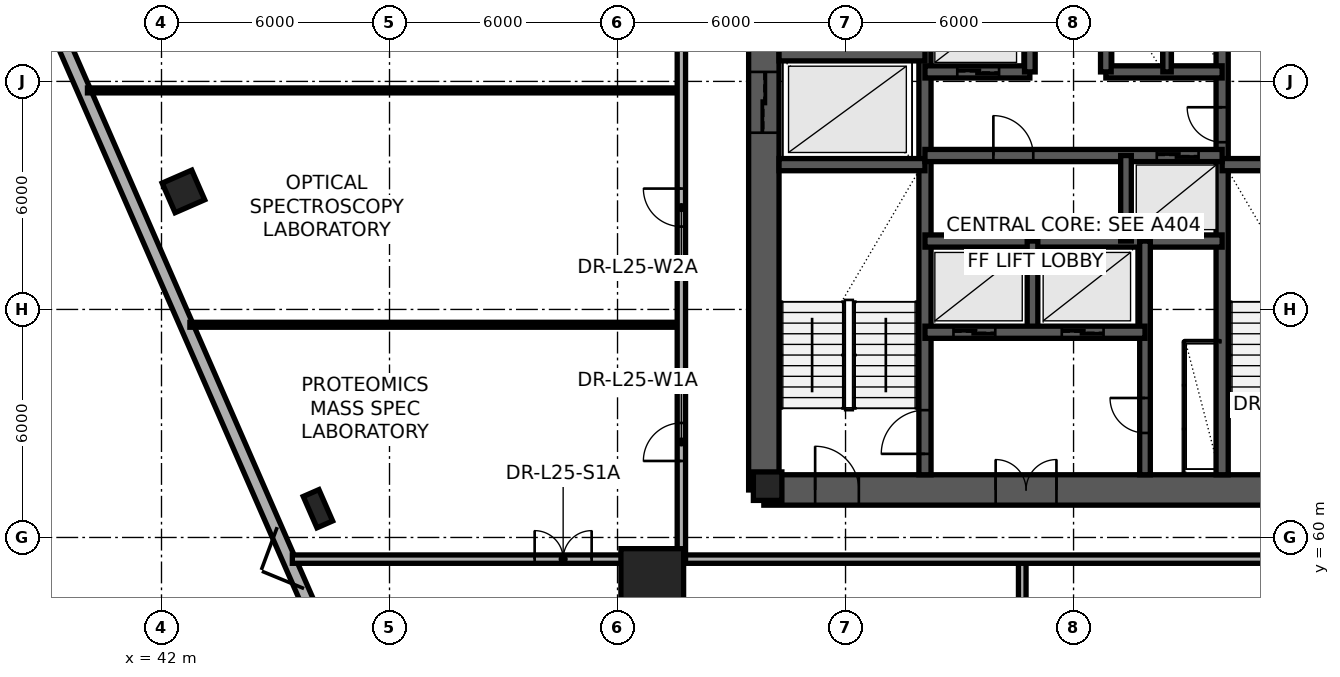
"""IFC4 building model, lengths in metres.
Left out: names, types, materials, properties, quantities, classifications, styles, units other than length and angle.
Written with IfcOpenShell. Run it as: python <this file> out.ifc"""

import sys

from ifc_helpers import new_model, si_unit, direction, frame, frame_2d, origin, origin_2d, place, context, subcontext, project, spatial, rectangle, extrude, element, fill, save


model = new_model("IFC4")
c1 = context("Model", 3, precision=1e-05, world=origin(), true_north=direction((0.0, 1.0)))
c2 = subcontext(c1, "Body", "Model", "MODEL_VIEW")
j1 = project(units=[si_unit("LENGTHUNIT", "METRE"), si_unit("PLANEANGLEUNIT", "RADIAN")], contexts=[c1])
p1 = place(None, origin())
s1 = spatial("IfcSite", under=j1, at=p1, CompositionType="ELEMENT")
p2 = place(p1, origin())
s2 = spatial("IfcBuilding", under=s1, at=p2, CompositionType="ELEMENT")
p3 = place(p2, frame((0.0, 0.0, 96.9)))
s3 = spatial("IfcBuildingStorey", under=s2, at=p3, CompositionType="ELEMENT", Elevation=96.9)
p4 = place(p3, frame((57.85, 61.25, 0.0), z_axis=(0.0, 0.0, 1.0), x_axis=(1.0, 0.0, 0.0)))
e1 = element("IfcWall", 1, at=p4, inside=s3, PredefinedType="SHEAR", context=c2, shape_type="SweptSolid", body=[
    extrude(rectangle(XDim=16.3, YDim=0.8, at=frame_2d((8.15, 0.0))), origin(), (0.0, 0.0, 1.0), 3.65),
])
p5 = place(p4, frame((1.35, 0.0, 0.0)))
e2 = element("IfcOpeningElement", 2, at=p5, cuts=e1, PredefinedType="OPENING", context=c2, shape_type="SweptSolid", body=[
    extrude(rectangle(XDim=1.15, YDim=2.15, at=frame_2d((0.575, 1.075))), frame((0.0, 0.41, 0.0), z_axis=(0.0, -1.0, 0.0), x_axis=(1.0, 0.0, 0.0)), (0.0, 0.0, 1.0), 0.82),
])
p6 = place(p4, frame((6.1, 0.0, 0.0)))
e3 = element("IfcOpeningElement", 3, at=p6, cuts=e1, PredefinedType="OPENING", context=c2, shape_type="SweptSolid", body=[
    extrude(rectangle(XDim=1.6, YDim=2.15, at=frame_2d((0.8, 1.075))), frame((0.0, 0.41, 0.0), z_axis=(0.0, -1.0, 0.0), x_axis=(1.0, 0.0, 0.0)), (0.0, 0.0, 1.0), 0.82),
])
p7 = place(p4, frame((13.55, 0.0, 0.0)))
e4 = element("IfcOpeningElement", 4, at=p7, cuts=e1, PredefinedType="OPENING", context=c2, shape_type="SweptSolid", body=[
    extrude(rectangle(XDim=1.15, YDim=2.15, at=frame_2d((0.575, 1.075))), frame((0.0, 0.41, 0.0), z_axis=(0.0, -1.0, 0.0), x_axis=(1.0, 0.0, 0.0)), (0.0, 0.0, 1.0), 0.82),
])
p8 = place(p3, frame((57.85, 74.75, 0.0), z_axis=(0.0, 0.0, 1.0), x_axis=(0.0, -1.0, 0.0)))
e5 = element("IfcWall", 5, at=p8, inside=s3, PredefinedType="SHEAR", context=c2, shape_type="SweptSolid", body=[
    extrude(rectangle(XDim=13.5, YDim=0.8, at=frame_2d((6.75, 0.0))), origin(), (0.0, 0.0, 1.0), 3.65),
])
p9 = place(p8, frame((0.8, 0.0, 0.0)))
e6 = element("IfcOpeningElement", 6, at=p9, cuts=e5, PredefinedType="OPENING", context=c2, shape_type="SweptSolid", body=[
    extrude(rectangle(XDim=0.92, YDim=2.05, at=frame_2d((0.46, 1.025))), frame((0.0, 0.41, 0.0), z_axis=(0.0, -1.0, 0.0), x_axis=(1.0, 0.0, 0.0)), (0.0, 0.0, 1.0), 0.82),
])
p10 = place(p8, frame((2.5, 0.0, 0.0)))
e7 = element("IfcOpeningElement", 7, at=p10, cuts=e5, PredefinedType="OPENING", context=c2, shape_type="SweptSolid", body=[
    extrude(rectangle(XDim=1.6, YDim=2.3, at=frame_2d((0.8, 1.15))), frame((0.0, 0.41, 0.0), z_axis=(0.0, -1.0, 0.0), x_axis=(1.0, 0.0, 0.0)), (0.0, 0.0, 1.0), 0.82),
])
p11 = place(p3, frame((62.09, 61.65, 0.0), z_axis=(0.0, 0.0, 1.0), x_axis=(0.0, 1.0, 0.0)))
e8 = element("IfcWall", 8, at=p11, inside=s3, PredefinedType="SHEAR", context=c2, shape_type="SweptSolid", body=[
    extrude(rectangle(XDim=12.7, YDim=0.32, at=frame_2d((6.35, 0.0))), origin(), (0.0, 0.0, 1.0), 3.65),
])
p12 = place(p11, frame((0.55, 0.0, 0.0)))
e9 = element("IfcOpeningElement", 9, at=p12, cuts=e8, PredefinedType="OPENING", context=c2, shape_type="SweptSolid", body=[
    extrude(rectangle(XDim=1.15, YDim=2.15, at=frame_2d((0.575, 1.075))), frame((0.0, 0.17, 0.0), z_axis=(0.0, -1.0, 0.0), x_axis=(1.0, 0.0, 0.0)), (0.0, 0.0, 1.0), 0.34),
])
p13 = place(p3, frame((69.91, 61.65, 0.0), z_axis=(0.0, 0.0, 1.0), x_axis=(0.0, 1.0, 0.0)))
e10 = element("IfcWall", 10, at=p13, inside=s3, PredefinedType="SHEAR", context=c2, shape_type="SweptSolid", body=[
    extrude(rectangle(XDim=12.7, YDim=0.32, at=frame_2d((6.35, 0.0))), origin(), (0.0, 0.0, 1.0), 3.65),
])
p14 = place(p13, frame((8.75, 0.0, 0.0)))
e11 = element("IfcOpeningElement", 11, at=p14, cuts=e10, PredefinedType="OPENING", context=c2, shape_type="SweptSolid", body=[
    extrude(rectangle(XDim=0.92, YDim=2.05, at=frame_2d((0.46, 1.025))), frame((0.0, 0.17, 0.0), z_axis=(0.0, -1.0, 0.0), x_axis=(1.0, 0.0, 0.0)), (0.0, 0.0, 1.0), 0.34),
])
for number, where, z_axis, x_axis in (
    (12, (58.25, 69.81, 0.0), (0.0, 0.0, 1.0), (1.0, 0.0, 0.0)),
    (13, (69.91, 69.81, 0.0), (0.0, 0.0, 1.0), (1.0, 0.0, 0.0)),
    (14, (58.25, 72.7, 0.0), (0.0, 0.0, 1.0), (1.0, 0.0, 0.0)),
):
    element("IfcWall", number, at=place(p3, frame(where, z_axis=z_axis, x_axis=x_axis)), inside=s3, PredefinedType="SHEAR", context=c2, shape_type="SweptSolid", body=[
        extrude(rectangle(XDim=3.84, YDim=0.32, at=frame_2d((1.92, 0.0))), origin(), (0.0, 0.0, 1.0), 3.65),
    ])
p15 = place(p3, frame((62.09, 67.8, 0.0), z_axis=(0.0, 0.0, 1.0), x_axis=(1.0, 0.0, 0.0)))
e15 = element("IfcWall", 15, at=p15, inside=s3, PredefinedType="SHEAR", context=c2, shape_type="SweptSolid", body=[
    extrude(rectangle(XDim=7.82, YDim=0.32, at=frame_2d((3.91, 0.0))), origin(), (0.0, 0.0, 1.0), 3.65),
])
p16 = place(p3, frame((64.92, 65.4, 0.0), z_axis=(0.0, 0.0, 1.0), x_axis=(0.0, 1.0, 0.0)))
e16 = element("IfcWall", 16, at=p16, inside=s3, PredefinedType="SHEAR", context=c2, shape_type="SweptSolid", body=[
    extrude(rectangle(XDim=2.4, YDim=0.28, at=frame_2d((1.2, 0.0))), origin(), (0.0, 0.0, 1.0), 3.65),
])
p17 = place(p3, frame((62.09, 70.05, 0.0), z_axis=(0.0, 0.0, 1.0), x_axis=(1.0, 0.0, 0.0)))
e17 = element("IfcWall", 17, at=p17, inside=s3, PredefinedType="SHEAR", context=c2, shape_type="SweptSolid", body=[
    extrude(rectangle(XDim=7.82, YDim=0.32, at=frame_2d((3.91, 0.0))), origin(), (0.0, 0.0, 1.0), 3.65),
])
p18 = place(p17, frame((1.8, 0.0, 0.0)))
e18 = element("IfcOpeningElement", 18, at=p18, cuts=e17, PredefinedType="OPENING", context=c2, shape_type="SweptSolid", body=[
    extrude(rectangle(XDim=1.05, YDim=2.15, at=frame_2d((0.525, 1.075))), frame((0.0, 0.17, 0.0), z_axis=(0.0, -1.0, 0.0), x_axis=(1.0, 0.0, 0.0)), (0.0, 0.0, 1.0), 0.34),
])
p19 = place(p17, frame((6.1, 0.0, 0.0)))
e19 = element("IfcOpeningElement", 19, at=p19, cuts=e17, PredefinedType="OPENING", context=c2, shape_type="SweptSolid", body=[
    extrude(rectangle(XDim=1.1, YDim=2.2, at=frame_2d((0.55, 1.1))), frame((0.0, 0.17, 0.0), z_axis=(0.0, -1.0, 0.0), x_axis=(1.0, 0.0, 0.0)), (0.0, 0.0, 1.0), 0.34),
])
p20 = place(p3, frame((62.09, 72.25, 0.0), z_axis=(0.0, 0.0, 1.0), x_axis=(1.0, 0.0, 0.0)))
e20 = element("IfcWall", 20, at=p20, inside=s3, PredefinedType="SHEAR", context=c2, shape_type="SweptSolid", body=[
    extrude(rectangle(XDim=2.76, YDim=0.32, at=frame_2d((1.38, 0.0))), origin(), (0.0, 0.0, 1.0), 3.65),
])
p21 = place(p20, frame((0.85, 0.0, 0.0)))
e21 = element("IfcOpeningElement", 21, at=p21, cuts=e20, PredefinedType="OPENING", context=c2, shape_type="SweptSolid", body=[
    extrude(rectangle(XDim=1.1, YDim=2.2, at=frame_2d((0.55, 1.1))), frame((0.0, 0.17, 0.0), z_axis=(0.0, -1.0, 0.0), x_axis=(1.0, 0.0, 0.0)), (0.0, 0.0, 1.0), 0.34),
])
p22 = place(p3, frame((66.85, 72.25, 0.0), z_axis=(0.0, 0.0, 1.0), x_axis=(1.0, 0.0, 0.0)))
e22 = element("IfcWall", 22, at=p22, inside=s3, PredefinedType="SHEAR", context=c2, shape_type="SweptSolid", body=[
    extrude(rectangle(XDim=3.06, YDim=0.32, at=frame_2d((1.53, 0.0))), origin(), (0.0, 0.0, 1.0), 3.65),
])
for number, where, z_axis, x_axis in (
    (23, (64.85, 72.25, 0.0), (0.0, 0.0, 1.0), (0.0, 1.0, 0.0)),
    (24, (66.85, 72.25, 0.0), (0.0, 0.0, 1.0), (0.0, 1.0, 0.0)),
):
    element("IfcWall", number, at=place(p3, frame(where, z_axis=z_axis, x_axis=x_axis)), inside=s3, PredefinedType="SHEAR", context=c2, shape_type="SweptSolid", body=[
        extrude(rectangle(XDim=2.1, YDim=0.28, at=frame_2d((1.05, 0.0))), origin(), (0.0, 0.0, 1.0), 3.65),
    ])
p23 = place(p3, frame((68.46, 72.25, 0.0), z_axis=(0.0, 0.0, 1.0), x_axis=(0.0, 1.0, 0.0)))
e25 = element("IfcWall", 25, at=p23, inside=s3, PredefinedType="SHEAR", context=c2, shape_type="SweptSolid", body=[
    extrude(rectangle(XDim=2.1, YDim=0.22, at=frame_2d((1.05, 0.0))), origin(), (0.0, 0.0, 1.0), 3.65),
])
p24 = place(p3, frame((67.88, 61.65, 0.0), z_axis=(0.0, 0.0, 1.0), x_axis=(0.0, 1.0, 0.0)))
e26 = element("IfcWall", 26, at=p24, inside=s3, PredefinedType="SHEAR", context=c2, shape_type="SweptSolid", body=[
    extrude(rectangle(XDim=6.15, YDim=0.28, at=frame_2d((3.075, 0.0))), origin(), (0.0, 0.0, 1.0), 3.65),
])
p25 = place(p24, frame((1.1, 0.0, 0.0)))
e27 = element("IfcOpeningElement", 27, at=p25, cuts=e26, PredefinedType="OPENING", context=c2, shape_type="SweptSolid", body=[
    extrude(rectangle(XDim=0.92, YDim=2.05, at=frame_2d((0.46, 1.025))), frame((0.0, 0.15, 0.0), z_axis=(0.0, -1.0, 0.0), x_axis=(1.0, 0.0, 0.0)), (0.0, 0.0, 1.0), 0.3),
])
p26 = place(p3, frame((62.09, 65.4, 0.0), z_axis=(0.0, 0.0, 1.0), x_axis=(1.0, 0.0, 0.0)))
e28 = element("IfcWall", 28, at=p26, inside=s3, PredefinedType="SHEAR", context=c2, shape_type="SweptSolid", body=[
    extrude(rectangle(XDim=5.79, YDim=0.32, at=frame_2d((2.895, 0.0))), origin(), (0.0, 0.0, 1.0), 3.65),
])
p27 = place(p26, frame((0.75, 0.0, 0.0)))
e29 = element("IfcOpeningElement", 29, at=p27, cuts=e28, PredefinedType="OPENING", context=c2, shape_type="SweptSolid", body=[
    extrude(rectangle(XDim=1.1, YDim=2.2, at=frame_2d((0.55, 1.1))), frame((0.0, 0.17, 0.0), z_axis=(0.0, -1.0, 0.0), x_axis=(1.0, 0.0, 0.0)), (0.0, 0.0, 1.0), 0.34),
])
p28 = place(p26, frame((3.6, 0.0, 0.0)))
e30 = element("IfcOpeningElement", 30, at=p28, cuts=e28, PredefinedType="OPENING", context=c2, shape_type="SweptSolid", body=[
    extrude(rectangle(XDim=1.1, YDim=2.2, at=frame_2d((0.55, 1.1))), frame((0.0, 0.17, 0.0), z_axis=(0.0, -1.0, 0.0), x_axis=(1.0, 0.0, 0.0)), (0.0, 0.0, 1.0), 0.34),
])
p29 = place(p3, frame((67.38, 67.8, 0.0), z_axis=(0.0, 0.0, 1.0), x_axis=(0.0, 1.0, 0.0)))
e31 = element("IfcWall", 31, at=p29, inside=s3, PredefinedType="SHEAR", context=c2, shape_type="SweptSolid", body=[
    extrude(rectangle(XDim=2.25, YDim=0.28, at=frame_2d((1.125, 0.0))), origin(), (0.0, 0.0, 1.0), 3.65),
])
p30 = place(p3, frame((57.95, 61.35, 0.0), z_axis=(0.0, 0.0, 1.0), x_axis=(1.0, 0.0, 0.0)))
e32 = element("IfcColumn", 32, at=p30, inside=s3, PredefinedType="COLUMN", context=c2, shape_type="SweptSolid", body=[
    extrude(rectangle(XDim=0.75, YDim=0.75, at=origin_2d()), origin(), (0.0, 0.0, 1.0), 3.65),
])
p31 = place(p3, frame((54.914, 58.88, 0.0), z_axis=(0.0, 0.0, 1.0), x_axis=(1.0, 0.0, 0.0)))
e33 = element("IfcColumn", 33, at=p31, inside=s3, PredefinedType="COLUMN", context=c2, shape_type="SweptSolid", body=[
    extrude(rectangle(XDim=1.65, YDim=1.65, at=origin_2d()), origin(), (0.0, 0.0, 1.0), 3.65),
])
p32 = place(p3, frame((42.506, 69.115, 0.003), z_axis=(0.039229493406, -0.00569028488, 0.999214024874), x_axis=(0.963587524212, 0.264914672989, -0.036322158782)))
e34 = element("IfcColumn", 34, at=p32, inside=s3, PredefinedType="COLUMN", context=c2, shape_type="SweptSolid", body=[
    extrude(rectangle(XDim=0.85, YDim=0.85, at=origin_2d()), origin(), (0.0, 0.0, 1.0), 3.647),
])
p33 = place(p3, frame((46.058, 60.738, 0.003), z_axis=(0.032006476949, 0.010512587617, 0.999432374368), x_axis=(0.745076502926, 0.666264296085, -0.030868957717)))
e35 = element("IfcColumn", 35, at=p33, inside=s3, PredefinedType="PILASTER", context=c2, shape_type="SweptSolid", body=[
    extrude(rectangle(XDim=0.9, YDim=0.45, at=origin_2d()), origin(), (0.0, 0.0, 1.0), 3.646),
])
p34 = place(p3, frame((61.235, 23.092, 0.0), z_axis=(0.0, 0.0, 1.0), x_axis=(-0.400542161224, 0.916278329484, 0.0)))
e36 = element("IfcWall", 36, at=p34, inside=s3, PredefinedType="STANDARD", context=c2, shape_type="SweptSolid", body=[
    extrude(rectangle(XDim=65.459, YDim=0.34, at=frame_2d((32.73, 0.0))), origin(), (0.0, 0.0, 1.0), 0.85),
])
p35 = place(p3, frame((64.65, 20.442, 0.0), z_axis=(0.0, 0.0, 1.0), x_axis=(0.0, 1.0, 0.0)))
e37 = element("IfcWall", 37, at=p35, inside=s3, PredefinedType="PARTITIONING", context=c2, shape_type="SweptSolid", body=[
    extrude(rectangle(XDim=38.988, YDim=0.2, at=frame_2d((19.494, 0.0))), origin(), (0.0, 0.0, 1.0), 2.505),
])
p36 = place(p3, frame((45.443, 59.43, 0.0), z_axis=(0.0, 0.0, 1.0), x_axis=(1.0, 0.0, 0.0)))
e38 = element("IfcWall", 38, at=p36, inside=s3, PredefinedType="PARTITIONING", context=c2, shape_type="SweptSolid", body=[
    extrude(rectangle(XDim=41.114, YDim=0.22, at=frame_2d((20.557, 0.0))), origin(), (0.0, 0.0, 1.0), 2.505),
])
p37 = place(p36, frame((6.376, 0.0, 0.0)))
e39 = element("IfcOpeningElement", 39, at=p37, cuts=e38, PredefinedType="OPENING", context=c2, shape_type="SweptSolid", body=[
    extrude(rectangle(XDim=1.5, YDim=2.2, at=frame_2d((0.75, 1.1))), frame((0.0, 0.12, 0.0), z_axis=(0.0, -1.0, 0.0), x_axis=(1.0, 0.0, 0.0)), (0.0, 0.0, 1.0), 0.24),
])
p38 = place(p36, frame((25.514, 0.0, 0.0)))
e40 = element("IfcOpeningElement", 40, at=p38, cuts=e38, PredefinedType="OPENING", context=c2, shape_type="SweptSolid", body=[
    extrude(rectangle(XDim=1.5, YDim=2.2, at=frame_2d((0.75, 1.1))), frame((0.0, 0.12, 0.0), z_axis=(0.0, -1.0, 0.0), x_axis=(1.0, 0.0, 0.0)), (0.0, 0.0, 1.0), 0.24),
])
p39 = place(p3, frame((42.747, 65.597, 0.0), z_axis=(0.0, 0.0, 1.0), x_axis=(1.0, 0.0, 0.0)))
e41 = element("IfcWall", 41, at=p39, inside=s3, PredefinedType="PARTITIONING", context=c2, shape_type="SweptSolid", body=[
    extrude(rectangle(XDim=12.933, YDim=0.13, at=frame_2d((6.466, 0.0))), origin(), (0.0, 0.0, 1.0), 2.505),
])
p40 = place(p3, frame((40.052, 71.763, 0.0), z_axis=(0.0, 0.0, 1.0), x_axis=(1.0, 0.0, 0.0)))
e42 = element("IfcWall", 42, at=p40, inside=s3, PredefinedType="PARTITIONING", context=c2, shape_type="SweptSolid", body=[
    extrude(rectangle(XDim=15.628, YDim=0.13, at=frame_2d((7.814, 0.0))), origin(), (0.0, 0.0, 1.0), 2.505),
])
p41 = place(p3, frame((55.68, 59.43, 0.0), z_axis=(0.0, 0.0, 1.0), x_axis=(0.0, 1.0, 0.0)))
e43 = element("IfcWall", 43, at=p41, inside=s3, PredefinedType="PARTITIONING", context=c2, shape_type="SweptSolid", body=[
    extrude(rectangle(XDim=18.5, YDim=0.22, at=frame_2d((9.25, 0.0))), origin(), (0.0, 0.0, 1.0), 2.655),
])
p42 = place(p41, frame((2.583, 0.0, 0.0)))
e44 = element("IfcOpeningElement", 44, at=p42, cuts=e43, PredefinedType="OPENING", context=c2, shape_type="SweptSolid", body=[
    extrude(rectangle(XDim=1.0, YDim=2.1, at=frame_2d((0.5, 1.05))), frame((0.0, 0.12, 0.0), z_axis=(0.0, -1.0, 0.0), x_axis=(1.0, 0.0, 0.0)), (0.0, 0.0, 1.0), 0.24),
])
p43 = place(p41, frame((8.75, 0.0, 0.0)))
e45 = element("IfcOpeningElement", 45, at=p43, cuts=e43, PredefinedType="OPENING", context=c2, shape_type="SweptSolid", body=[
    extrude(rectangle(XDim=1.0, YDim=2.1, at=frame_2d((0.5, 1.05))), frame((0.0, 0.12, 0.0), z_axis=(0.0, -1.0, 0.0), x_axis=(1.0, 0.0, 0.0)), (0.0, 0.0, 1.0), 0.24),
])
p44 = place(p41, frame((14.917, 0.0, 0.0)))
e46 = element("IfcOpeningElement", 46, at=p44, cuts=e43, PredefinedType="OPENING", context=c2, shape_type="SweptSolid", body=[
    extrude(rectangle(XDim=1.0, YDim=2.1, at=frame_2d((0.5, 1.05))), frame((0.0, 0.12, 0.0), z_axis=(0.0, -1.0, 0.0), x_axis=(1.0, 0.0, 0.0)), (0.0, 0.0, 1.0), 0.24),
])
p45 = place(p12, origin())
e47 = element("IfcDoor", 47, at=p45, inside=s3, OperationType="SINGLE_SWING_LEFT", PredefinedType="DOOR", context=c2, shape_type="SweptSolid", body=[
    extrude(rectangle(XDim=1.15, YDim=2.15, at=frame_2d((0.575, 1.075))), frame((0.0, 0.025, 0.0), z_axis=(0.0, -1.0, 0.0), x_axis=(1.0, 0.0, 0.0)), (0.0, 0.0, 1.0), 0.05),
])
fill(e9, e47)
p46 = place(p25, origin())
e48 = element("IfcDoor", 48, at=p46, inside=s3, OperationType="SINGLE_SWING_RIGHT", PredefinedType="DOOR", context=c2, shape_type="SweptSolid", body=[
    extrude(rectangle(XDim=0.92, YDim=2.05, at=frame_2d((0.46, 1.025))), frame((0.0, 0.025, 0.0), z_axis=(0.0, -1.0, 0.0), x_axis=(1.0, 0.0, 0.0)), (0.0, 0.0, 1.0), 0.05),
])
fill(e27, e48)
p47 = place(p27, origin())
e49 = element("IfcDoor", 49, at=p47, inside=s3, OperationType="SLIDING_TO_LEFT", PredefinedType="DOOR", context=c2, shape_type="SweptSolid", body=[
    extrude(rectangle(XDim=1.1, YDim=2.2, at=frame_2d((0.55, 1.1))), frame((0.0, 0.025, 0.0), z_axis=(0.0, -1.0, 0.0), x_axis=(1.0, 0.0, 0.0)), (0.0, 0.0, 1.0), 0.05),
])
fill(e29, e49)
p48 = place(p28, origin())
e50 = element("IfcDoor", 50, at=p48, inside=s3, OperationType="SLIDING_TO_LEFT", PredefinedType="DOOR", context=c2, shape_type="SweptSolid", body=[
    extrude(rectangle(XDim=1.1, YDim=2.2, at=frame_2d((0.55, 1.1))), frame((0.0, 0.025, 0.0), z_axis=(0.0, -1.0, 0.0), x_axis=(1.0, 0.0, 0.0)), (0.0, 0.0, 1.0), 0.05),
])
fill(e30, e50)
p49 = place(p18, origin())
e51 = element("IfcDoor", 51, at=p49, inside=s3, OperationType="SINGLE_SWING_LEFT", PredefinedType="DOOR", context=c2, shape_type="SweptSolid", body=[
    extrude(rectangle(XDim=1.05, YDim=2.15, at=frame_2d((0.525, 1.075))), frame((0.0, 0.025, 0.0), z_axis=(0.0, -1.0, 0.0), x_axis=(1.0, 0.0, 0.0)), (0.0, 0.0, 1.0), 0.05),
])
fill(e18, e51)
p50 = place(p19, origin())
e52 = element("IfcDoor", 52, at=p50, inside=s3, OperationType="SLIDING_TO_LEFT", PredefinedType="DOOR", context=c2, shape_type="SweptSolid", body=[
    extrude(rectangle(XDim=1.1, YDim=2.2, at=frame_2d((0.55, 1.1))), frame((0.0, 0.025, 0.0), z_axis=(0.0, -1.0, 0.0), x_axis=(1.0, 0.0, 0.0)), (0.0, 0.0, 1.0), 0.05),
])
fill(e19, e52)
p51 = place(p21, origin())
e53 = element("IfcDoor", 53, at=p51, inside=s3, OperationType="SLIDING_TO_LEFT", PredefinedType="DOOR", context=c2, shape_type="SweptSolid", body=[
    extrude(rectangle(XDim=1.1, YDim=2.2, at=frame_2d((0.55, 1.1))), frame((0.0, 0.025, 0.0), z_axis=(0.0, -1.0, 0.0), x_axis=(1.0, 0.0, 0.0)), (0.0, 0.0, 1.0), 0.05),
])
fill(e21, e53)
p52 = place(p5, origin())
e54 = element("IfcDoor", 54, at=p52, inside=s3, OperationType="SINGLE_SWING_LEFT", PredefinedType="DOOR", context=c2, shape_type="SweptSolid", body=[
    extrude(rectangle(XDim=1.15, YDim=2.15, at=frame_2d((0.575, 1.075))), frame((0.0, 0.025, 0.0), z_axis=(0.0, -1.0, 0.0), x_axis=(1.0, 0.0, 0.0)), (0.0, 0.0, 1.0), 0.05),
])
fill(e2, e54)
p53 = place(p6, origin())
e55 = element("IfcDoor", 55, at=p53, inside=s3, OperationType="DOUBLE_DOOR_SINGLE_SWING", PredefinedType="DOOR", context=c2, shape_type="SweptSolid", body=[
    extrude(rectangle(XDim=1.6, YDim=2.15, at=frame_2d((0.8, 1.075))), frame((0.0, 0.025, 0.0), z_axis=(0.0, -1.0, 0.0), x_axis=(1.0, 0.0, 0.0)), (0.0, 0.0, 1.0), 0.05),
])
fill(e3, e55)
p54 = place(p10, origin())
e56 = element("IfcDoor", 56, at=p54, inside=s3, OperationType="DOUBLE_DOOR_SLIDING", PredefinedType="DOOR", context=c2, shape_type="SweptSolid", body=[
    extrude(rectangle(XDim=1.6, YDim=2.3, at=frame_2d((0.8, 1.15))), frame((0.0, 0.025, 0.0), z_axis=(0.0, -1.0, 0.0), x_axis=(1.0, 0.0, 0.0)), (0.0, 0.0, 1.0), 0.05),
])
fill(e7, e56)
p55 = place(p14, origin())
e57 = element("IfcDoor", 57, at=p55, inside=s3, OperationType="SINGLE_SWING_RIGHT", PredefinedType="DOOR", context=c2, shape_type="SweptSolid", body=[
    extrude(rectangle(XDim=0.92, YDim=2.05, at=frame_2d((0.46, 1.025))), frame((0.0, 0.025, 0.0), z_axis=(0.0, -1.0, 0.0), x_axis=(1.0, 0.0, 0.0)), (0.0, 0.0, 1.0), 0.05),
])
fill(e11, e57)
p56 = place(p37, origin())
e58 = element("IfcDoor", 58, at=p56, inside=s3, OperationType="DOUBLE_DOOR_SINGLE_SWING", PredefinedType="DOOR", context=c2, shape_type="SweptSolid", body=[
    extrude(rectangle(XDim=1.5, YDim=2.2, at=frame_2d((0.75, 1.1))), frame((0.0, 0.025, 0.0), z_axis=(0.0, -1.0, 0.0), x_axis=(1.0, 0.0, 0.0)), (0.0, 0.0, 1.0), 0.05),
])
fill(e39, e58)
p57 = place(p42, origin())
e59 = element("IfcDoor", 59, at=p57, inside=s3, OperationType="SINGLE_SWING_LEFT", PredefinedType="DOOR", context=c2, shape_type="SweptSolid", body=[
    extrude(rectangle(XDim=1.0, YDim=2.1, at=frame_2d((0.5, 1.05))), frame((0.0, 0.025, 0.0), z_axis=(0.0, -1.0, 0.0), x_axis=(1.0, 0.0, 0.0)), (0.0, 0.0, 1.0), 0.05),
])
fill(e44, e59)
p58 = place(p43, origin())
e60 = element("IfcDoor", 60, at=p58, inside=s3, OperationType="SINGLE_SWING_RIGHT", PredefinedType="DOOR", context=c2, shape_type="SweptSolid", body=[
    extrude(rectangle(XDim=1.0, YDim=2.1, at=frame_2d((0.5, 1.05))), frame((0.0, 0.025, 0.0), z_axis=(0.0, -1.0, 0.0), x_axis=(1.0, 0.0, 0.0)), (0.0, 0.0, 1.0), 0.05),
])
fill(e45, e60)
save(model, sys.argv[1])
